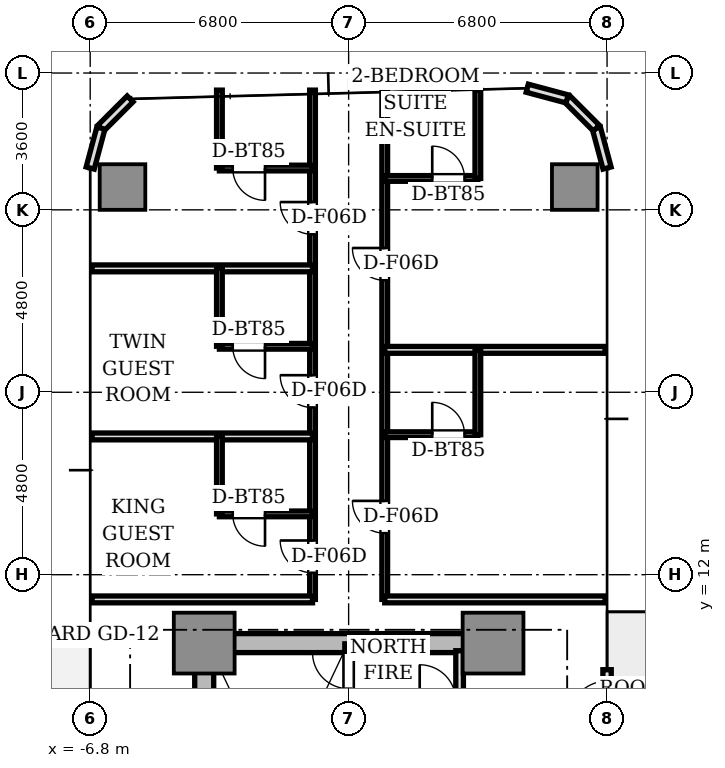
"""IFC4 building model, lengths in metres.
Left out: names, types, materials, properties, quantities, classifications, styles, units other than length and angle.
Written with IfcOpenShell. Run it as: python <this file> out.ifc"""

import sys

from ifc_helpers import new_model, si_unit, direction, frame, frame_2d, origin, origin_2d, place, context, subcontext, project, spatial, rectangle, extrude, source, transform, mapped, element, fill, save


model = new_model("IFC4")
c1 = context("Model", 3, precision=1e-05, world=origin(), true_north=direction((0.0, 1.0)))
c2 = subcontext(c1, "Body", "Model", "MODEL_VIEW")
j1 = project(units=[si_unit("LENGTHUNIT", "METRE"), si_unit("PLANEANGLEUNIT", "RADIAN")], contexts=[c1])
p1 = place(None, origin())
s1 = spatial("IfcSite", under=j1, at=p1, CompositionType="ELEMENT")
p2 = place(p1, origin())
s2 = spatial("IfcBuilding", under=s1, at=p2, CompositionType="ELEMENT")
p3 = place(p2, frame((0.0, 0.0, 46.55)))
s3 = spatial("IfcBuildingStorey", under=s2, at=p3, CompositionType="ELEMENT", Elevation=46.55)
p4 = place(p3, frame((-3.55, 10.2, 0.0), z_axis=(0.0, 0.0, 1.0), x_axis=(1.0, 0.0, 0.0)))
e1 = element("IfcWall", 1, at=p4, inside=s3, PredefinedType="SHEAR", context=c2, shape_type="SweptSolid", body=[
    extrude(rectangle(XDim=7.1, YDim=0.5, at=frame_2d((3.55, 0.0))), origin(), (0.0, 0.0, 1.0), 4.26),
])
p5 = place(p3, frame((-3.8, 2.85, 0.0), z_axis=(0.0, 0.0, 1.0), x_axis=(0.0, 1.0, 0.0)))
e2 = element("IfcWall", 2, at=p5, inside=s3, PredefinedType="SHEAR", context=c2, shape_type="SweptSolid", body=[
    extrude(rectangle(XDim=6.9, YDim=0.5, at=frame_2d((3.45, 0.0))), origin(), (0.0, 0.0, 1.0), 4.26),
])
m1 = source(origin(), c2, "Body", "SweptSolid", [
    extrude(rectangle(XDim=1.6, YDim=1.6, at=origin_2d()), origin(), (0.0, 0.0, 1.0), 4.26),
])
for number, where, z_axis, x_axis in (
    (3, (-3.8, 10.2, 0.0), (0.0, 0.0, 1.0), (1.0, 0.0, 0.0)),
    (4, (3.8, 10.2, 0.0), (0.0, 0.0, 1.0), (1.0, 0.0, 0.0)),
):
    element("IfcColumn", number, at=place(p3, frame(where, z_axis=z_axis, x_axis=x_axis)), inside=s3, PredefinedType="COLUMN", context=c2, shape_type="MappedRepresentation", body=[
        mapped(m1, transform((0.0, 0.0, 0.0), scale=1.0)),
    ])
m2 = source(origin(), c2, "Body", "SweptSolid", [
    extrude(rectangle(XDim=1.2, YDim=1.2, at=origin_2d()), origin(), (0.0, 0.0, 1.0), 4.26),
])
for number, where, z_axis, x_axis in (
    (5, (5.95, 22.2, 0.0), (0.0, 0.0, 1.0), (1.0, 0.0, 0.0)),
    (6, (-5.95, 22.2, 0.0), (0.0, 0.0, 1.0), (1.0, 0.0, 0.0)),
):
    element("IfcColumn", number, at=place(p3, frame(where, z_axis=z_axis, x_axis=x_axis)), inside=s3, PredefinedType="COLUMN", context=c2, shape_type="MappedRepresentation", body=[
        mapped(m2, transform((0.0, 0.0, 0.0), scale=1.0)),
    ])
p6 = place(p3, frame((6.8, 6.8, 0.0), z_axis=(0.0, 0.0, 1.0), x_axis=(0.0, 1.0, 0.0)))
e7 = element("IfcWall", 7, at=p6, inside=s3, PredefinedType="STANDARD", context=c2, shape_type="SweptSolid", body=[
    extrude(rectangle(XDim=2.7, YDim=0.22, at=frame_2d((1.35, 0.0))), origin(), (0.0, 0.0, 1.0), 4.26),
])
p7 = place(p6, frame((1.4, 0.0, 0.0)))
e8 = element("IfcOpeningElement", 8, at=p7, cuts=e7, PredefinedType="OPENING", context=c2, shape_type="SweptSolid", body=[
    extrude(rectangle(XDim=1.0, YDim=2.2, at=frame_2d((0.5, 1.1))), frame((0.0, 0.12, 0.0), z_axis=(0.0, -1.0, 0.0), x_axis=(1.0, 0.0, 0.0)), (0.0, 0.0, 1.0), 0.24),
])
for number, where, z_axis, x_axis in (
    (9, (6.8, 22.7, 0.0), (0.0, 0.0, 1.0), (-0.259, 0.966, 0.0)),
    (10, (6.519, 23.75, 0.0), (0.0, 0.0, 1.0), (-0.707, 0.707, 0.0)),
    (11, (5.75, 24.519, 0.0), (0.0, 0.0, 1.0), (-0.966, 0.259, 0.0)),
    (12, (-5.75, 24.519, 0.0), (0.0, 0.0, 1.0), (-0.707, -0.707, 0.0)),
    (13, (-6.519, 23.75, 0.0), (0.0, 0.0, 1.0), (-0.259, -0.966, 0.0)),
):
    element("IfcWall", number, at=place(p3, frame(where, z_axis=z_axis, x_axis=x_axis)), inside=s3, PredefinedType="STANDARD", context=c2, shape_type="SweptSolid", body=[
        extrude(rectangle(XDim=1.087, YDim=0.22, at=frame_2d((0.543, 0.0))), origin(), (0.0, 0.0, 1.0), 4.26),
    ])
p8 = place(p3, frame((0.0, 2.5, 0.0), z_axis=(0.0, 0.0, 1.0), x_axis=(0.0, 1.0, 0.0)))
e14 = element("IfcWall", 14, at=p8, inside=s3, PredefinedType="SOLIDWALL", context=c2, shape_type="SweptSolid", body=[
    extrude(rectangle(XDim=7.68, YDim=0.2, at=frame_2d((3.84, 0.0))), origin(), (0.0, 0.0, 1.0), 4.26),
])
p9 = place(p8, frame((6.5, 0.0, 0.0)))
e15 = element("IfcOpeningElement", 15, at=p9, cuts=e14, PredefinedType="OPENING", context=c2, shape_type="SweptSolid", body=[
    extrude(rectangle(XDim=0.95, YDim=2.15, at=frame_2d((0.475, 1.075))), frame((0.0, 0.11, 0.0), z_axis=(0.0, -1.0, 0.0), x_axis=(1.0, 0.0, 0.0)), (0.0, 0.0, 1.0), 0.22),
])
p10 = place(p3, frame((2.92, 8.68, 0.0), z_axis=(0.0, 0.0, 1.0), x_axis=(0.0, 1.0, 0.0)))
e16 = element("IfcWall", 16, at=p10, inside=s3, PredefinedType="SOLIDWALL", context=c2, shape_type="SweptSolid", body=[
    extrude(rectangle(XDim=1.32, YDim=0.2, at=frame_2d((0.66, 0.0))), origin(), (0.0, 0.0, 1.0), 3.81),
])
p11 = place(p3, frame((-0.95, 11.35, 0.0), z_axis=(0.0, 0.0, 1.0), x_axis=(0.0, 1.0, 0.0)))
e17 = element("IfcWall", 17, at=p11, inside=s3, PredefinedType="PARTITIONING", context=c2, shape_type="SweptSolid", body=[
    extrude(rectangle(XDim=13.4, YDim=0.15, at=frame_2d((6.7, 0.0))), origin(), (0.0, 0.0, 1.0), 3.81),
])
p12 = place(p11, frame((0.7, 0.0, 0.0)))
e18 = element("IfcOpeningElement", 18, at=p12, cuts=e17, PredefinedType="OPENING", context=c2, shape_type="SweptSolid", body=[
    extrude(rectangle(XDim=0.85, YDim=2.1, at=frame_2d((0.425, 1.05))), frame((0.0, 0.085, 0.0), z_axis=(0.0, -1.0, 0.0), x_axis=(1.0, 0.0, 0.0)), (0.0, 0.0, 1.0), 0.17),
])
p13 = place(p11, frame((5.049, 0.0, 0.0)))
e19 = element("IfcOpeningElement", 19, at=p13, cuts=e17, PredefinedType="OPENING", context=c2, shape_type="SweptSolid", body=[
    extrude(rectangle(XDim=0.85, YDim=2.1, at=frame_2d((0.425, 1.05))), frame((0.0, 0.085, 0.0), z_axis=(0.0, -1.0, 0.0), x_axis=(1.0, 0.0, 0.0)), (0.0, 0.0, 1.0), 0.17),
])
p14 = place(p11, frame((9.605, 0.0, 0.0)))
e20 = element("IfcOpeningElement", 20, at=p14, cuts=e17, PredefinedType="OPENING", context=c2, shape_type="SweptSolid", body=[
    extrude(rectangle(XDim=0.85, YDim=2.1, at=frame_2d((0.425, 1.05))), frame((0.0, 0.085, 0.0), z_axis=(0.0, -1.0, 0.0), x_axis=(1.0, 0.0, 0.0)), (0.0, 0.0, 1.0), 0.17),
])
p15 = place(p3, frame((0.95, 11.35, 0.0), z_axis=(0.0, 0.0, 1.0), x_axis=(0.0, 1.0, 0.0)))
e21 = element("IfcWall", 21, at=p15, inside=s3, PredefinedType="PARTITIONING", context=c2, shape_type="SweptSolid", body=[
    extrude(rectangle(XDim=13.4, YDim=0.15, at=frame_2d((6.7, 0.0))), origin(), (0.0, 0.0, 1.0), 3.81),
])
p16 = place(p15, frame((1.742, 0.0, 0.0)))
e22 = element("IfcOpeningElement", 22, at=p16, cuts=e21, PredefinedType="OPENING", context=c2, shape_type="SweptSolid", body=[
    extrude(rectangle(XDim=0.85, YDim=2.1, at=frame_2d((0.425, 1.05))), frame((0.0, 0.085, 0.0), z_axis=(0.0, -1.0, 0.0), x_axis=(1.0, 0.0, 0.0)), (0.0, 0.0, 1.0), 0.17),
])
p17 = place(p15, frame((8.396, 0.0, 0.0)))
e23 = element("IfcOpeningElement", 23, at=p17, cuts=e21, PredefinedType="OPENING", context=c2, shape_type="SweptSolid", body=[
    extrude(rectangle(XDim=0.85, YDim=2.1, at=frame_2d((0.425, 1.05))), frame((0.0, 0.085, 0.0), z_axis=(0.0, -1.0, 0.0), x_axis=(1.0, 0.0, 0.0)), (0.0, 0.0, 1.0), 0.17),
])
for number, where, z_axis, x_axis in (
    (24, (-0.95, 11.35, 0.0), (0.0, 0.0, 1.0), (-1.0, 0.0, 0.0)),
    (25, (6.75, 11.35, 0.0), (0.0, 0.0, 1.0), (-1.0, 0.0, 0.0)),
    (26, (-0.95, 15.638, 0.0), (0.0, 0.0, 1.0), (-1.0, 0.0, 0.0)),
):
    element("IfcWall", number, at=place(p3, frame(where, z_axis=z_axis, x_axis=x_axis)), inside=s3, PredefinedType="PARTITIONING", context=c2, shape_type="SweptSolid", body=[
        extrude(rectangle(XDim=5.8, YDim=0.18, at=frame_2d((2.9, 0.0))), origin(), (0.0, 0.0, 1.0), 3.81),
    ])
p18 = place(p3, frame((-0.95, 13.6, 0.0), z_axis=(0.0, 0.0, 1.0), x_axis=(-1.0, 0.0, 0.0)))
e27 = element("IfcWall", 27, at=p18, inside=s3, PredefinedType="PARTITIONING", context=c2, shape_type="SweptSolid", body=[
    extrude(rectangle(XDim=2.45, YDim=0.15, at=frame_2d((1.225, 0.0))), origin(), (0.0, 0.0, 1.0), 3.78),
])
p19 = place(p18, frame((1.25, 0.0, 0.0)))
e28 = element("IfcOpeningElement", 28, at=p19, cuts=e27, PredefinedType="OPENING", context=c2, shape_type="SweptSolid", body=[
    extrude(rectangle(XDim=0.85, YDim=2.1, at=frame_2d((0.425, 1.05))), frame((0.0, 0.085, 0.0), z_axis=(0.0, -1.0, 0.0), x_axis=(1.0, 0.0, 0.0)), (0.0, 0.0, 1.0), 0.17),
])
p20 = place(p3, frame((-3.4, 13.6, 0.0), z_axis=(0.0, 0.0, 1.0), x_axis=(0.0, 1.0, 0.0)))
e29 = element("IfcWall", 29, at=p20, inside=s3, PredefinedType="PARTITIONING", context=c2, shape_type="SweptSolid", body=[
    extrude(rectangle(XDim=2.038, YDim=0.15, at=frame_2d((1.019, 0.0))), origin(), (0.0, 0.0, 1.0), 3.81),
])
p21 = place(p3, frame((-0.95, 20.06, 0.0), z_axis=(0.0, 0.0, 1.0), x_axis=(-1.0, 0.0, 0.0)))
e30 = element("IfcWall", 30, at=p21, inside=s3, PredefinedType="PARTITIONING", context=c2, shape_type="SweptSolid", body=[
    extrude(rectangle(XDim=5.8, YDim=0.18, at=frame_2d((2.9, 0.0))), origin(), (0.0, 0.0, 1.0), 3.81),
])
p22 = place(p3, frame((-0.95, 18.01, 0.0), z_axis=(0.0, 0.0, 1.0), x_axis=(-1.0, 0.0, 0.0)))
e31 = element("IfcWall", 31, at=p22, inside=s3, PredefinedType="PARTITIONING", context=c2, shape_type="SweptSolid", body=[
    extrude(rectangle(XDim=2.45, YDim=0.15, at=frame_2d((1.225, 0.0))), origin(), (0.0, 0.0, 1.0), 3.81),
])
p23 = place(p22, frame((1.25, 0.0, 0.0)))
e32 = element("IfcOpeningElement", 32, at=p23, cuts=e31, PredefinedType="OPENING", context=c2, shape_type="SweptSolid", body=[
    extrude(rectangle(XDim=0.85, YDim=2.1, at=frame_2d((0.425, 1.05))), frame((0.0, 0.085, 0.0), z_axis=(0.0, -1.0, 0.0), x_axis=(1.0, 0.0, 0.0)), (0.0, 0.0, 1.0), 0.17),
])
p24 = place(p3, frame((-3.4, 18.01, 0.0), z_axis=(0.0, 0.0, 1.0), x_axis=(0.0, 1.0, 0.0)))
e33 = element("IfcWall", 33, at=p24, inside=s3, PredefinedType="PARTITIONING", context=c2, shape_type="SweptSolid", body=[
    extrude(rectangle(XDim=2.05, YDim=0.15, at=frame_2d((1.025, 0.0))), origin(), (0.0, 0.0, 1.0), 3.81),
])
p25 = place(p3, frame((-0.95, 22.7, 0.0), z_axis=(0.0, 0.0, 1.0), x_axis=(-1.0, 0.0, 0.0)))
e34 = element("IfcWall", 34, at=p25, inside=s3, PredefinedType="PARTITIONING", context=c2, shape_type="SweptSolid", body=[
    extrude(rectangle(XDim=2.45, YDim=0.15, at=frame_2d((1.225, 0.0))), origin(), (0.0, 0.0, 1.0), 3.81),
])
p26 = place(p25, frame((1.25, 0.0, 0.0)))
e35 = element("IfcOpeningElement", 35, at=p26, cuts=e34, PredefinedType="OPENING", context=c2, shape_type="SweptSolid", body=[
    extrude(rectangle(XDim=0.85, YDim=2.1, at=frame_2d((0.425, 1.05))), frame((0.0, 0.085, 0.0), z_axis=(0.0, -1.0, 0.0), x_axis=(1.0, 0.0, 0.0)), (0.0, 0.0, 1.0), 0.17),
])
p27 = place(p3, frame((-3.4, 22.7, 0.0), z_axis=(0.0, 0.0, 1.0), x_axis=(0.0, 1.0, 0.0)))
e36 = element("IfcWall", 36, at=p27, inside=s3, PredefinedType="PARTITIONING", context=c2, shape_type="SweptSolid", body=[
    extrude(rectangle(XDim=2.05, YDim=0.15, at=frame_2d((1.025, 0.0))), origin(), (0.0, 0.0, 1.0), 3.81),
])
p28 = place(p3, frame((0.95, 17.916, 0.0), z_axis=(0.0, 0.0, 1.0), x_axis=(1.0, 0.0, 0.0)))
e37 = element("IfcWall", 37, at=p28, inside=s3, PredefinedType="PARTITIONING", context=c2, shape_type="SweptSolid", body=[
    extrude(rectangle(XDim=5.8, YDim=0.18, at=frame_2d((2.9, 0.0))), origin(), (0.0, 0.0, 1.0), 3.81),
])
p29 = place(p3, frame((0.95, 15.684, 0.0), z_axis=(0.0, 0.0, 1.0), x_axis=(1.0, 0.0, 0.0)))
e38 = element("IfcWall", 38, at=p29, inside=s3, PredefinedType="PARTITIONING", context=c2, shape_type="SweptSolid", body=[
    extrude(rectangle(XDim=2.45, YDim=0.15, at=frame_2d((1.225, 0.0))), origin(), (0.0, 0.0, 1.0), 3.81),
])
p30 = place(p29, frame((1.25, 0.0, 0.0)))
e39 = element("IfcOpeningElement", 39, at=p30, cuts=e38, PredefinedType="OPENING", context=c2, shape_type="SweptSolid", body=[
    extrude(rectangle(XDim=0.85, YDim=2.1, at=frame_2d((0.425, 1.05))), frame((0.0, 0.085, 0.0), z_axis=(0.0, -1.0, 0.0), x_axis=(1.0, 0.0, 0.0)), (0.0, 0.0, 1.0), 0.17),
])
p31 = place(p3, frame((3.4, 15.684, 0.0), z_axis=(0.0, 0.0, 1.0), x_axis=(0.0, 1.0, 0.0)))
e40 = element("IfcWall", 40, at=p31, inside=s3, PredefinedType="PARTITIONING", context=c2, shape_type="SweptSolid", body=[
    extrude(rectangle(XDim=2.232, YDim=0.15, at=frame_2d((1.116, 0.0))), origin(), (0.0, 0.0, 1.0), 3.81),
])
p32 = place(p3, frame((0.95, 22.426, 0.0), z_axis=(0.0, 0.0, 1.0), x_axis=(1.0, 0.0, 0.0)))
e41 = element("IfcWall", 41, at=p32, inside=s3, PredefinedType="PARTITIONING", context=c2, shape_type="SweptSolid", body=[
    extrude(rectangle(XDim=2.45, YDim=0.15, at=frame_2d((1.225, 0.0))), origin(), (0.0, 0.0, 1.0), 3.73),
])
p33 = place(p32, frame((1.25, 0.0, 0.0)))
e42 = element("IfcOpeningElement", 42, at=p33, cuts=e41, PredefinedType="OPENING", context=c2, shape_type="SweptSolid", body=[
    extrude(rectangle(XDim=0.85, YDim=2.1, at=frame_2d((0.425, 1.05))), frame((0.0, 0.085, 0.0), z_axis=(0.0, -1.0, 0.0), x_axis=(1.0, 0.0, 0.0)), (0.0, 0.0, 1.0), 0.17),
])
p34 = place(p3, frame((3.4, 22.426, 0.0), z_axis=(0.0, 0.0, 1.0), x_axis=(0.0, 1.0, 0.0)))
e43 = element("IfcWall", 43, at=p34, inside=s3, PredefinedType="PARTITIONING", context=c2, shape_type="SweptSolid", body=[
    extrude(rectangle(XDim=2.324, YDim=0.15, at=frame_2d((1.162, 0.0))), origin(), (0.0, 0.0, 1.0), 3.81),
])
m3 = source(origin(), c2, "Body", "SweptSolid", [
    extrude(rectangle(XDim=1.0, YDim=0.05, at=origin_2d()), origin(), (0.0, 0.0, 1.0), 2.2),
])
p35 = place(p7, frame((0.5, 0.0, 0.0)))
e44 = element("IfcDoor", 44, at=p35, inside=s3, OperationType="SINGLE_SWING_LEFT", PredefinedType="DOOR", context=c2, shape_type="MappedRepresentation", body=[
    mapped(m3, transform((0.0, 0.0, 0.0), scale=1.0)),
])
fill(e8, e44)
m4 = source(origin(), c2, "Body", "SweptSolid", [
    extrude(rectangle(XDim=0.95, YDim=0.05, at=origin_2d()), origin(), (0.0, 0.0, 1.0), 2.15),
])
p36 = place(p9, frame((0.475, 0.0, 0.0)))
e45 = element("IfcDoor", 45, at=p36, inside=s3, OperationType="SINGLE_SWING_RIGHT", PredefinedType="DOOR", context=c2, shape_type="MappedRepresentation", body=[
    mapped(m4, transform((0.0, 0.0, 0.0), scale=1.0)),
])
fill(e15, e45)
m5 = source(origin(), c2, "Body", "SweptSolid", [
    extrude(rectangle(XDim=0.85, YDim=0.05, at=origin_2d()), origin(), (0.0, 0.0, 1.0), 2.1),
])
p37 = place(p19, frame((0.425, 0.0, 0.0)))
e46 = element("IfcDoor", 46, at=p37, inside=s3, OperationType="SINGLE_SWING_LEFT", PredefinedType="DOOR", context=c2, shape_type="MappedRepresentation", body=[
    mapped(m5, transform((0.0, 0.0, 0.0), scale=1.0)),
])
fill(e28, e46)
p38 = place(p12, frame((0.425, 0.0, 0.0)))
e47 = element("IfcDoor", 47, at=p38, inside=s3, OperationType="SINGLE_SWING_RIGHT", PredefinedType="DOOR", context=c2, shape_type="MappedRepresentation", body=[
    mapped(m5, transform((0.0, 0.0, 0.0), scale=1.0)),
])
fill(e18, e47)
p39 = place(p23, frame((0.425, 0.0, 0.0)))
e48 = element("IfcDoor", 48, at=p39, inside=s3, OperationType="SINGLE_SWING_LEFT", PredefinedType="DOOR", context=c2, shape_type="MappedRepresentation", body=[
    mapped(m5, transform((0.0, 0.0, 0.0), scale=1.0)),
])
fill(e32, e48)
p40 = place(p13, frame((0.425, 0.0, 0.0)))
e49 = element("IfcDoor", 49, at=p40, inside=s3, OperationType="SINGLE_SWING_RIGHT", PredefinedType="DOOR", context=c2, shape_type="MappedRepresentation", body=[
    mapped(m5, transform((0.0, 0.0, 0.0), scale=1.0)),
])
fill(e19, e49)
p41 = place(p26, frame((0.425, 0.0, 0.0)))
e50 = element("IfcDoor", 50, at=p41, inside=s3, OperationType="SINGLE_SWING_LEFT", PredefinedType="DOOR", context=c2, shape_type="MappedRepresentation", body=[
    mapped(m5, transform((0.0, 0.0, 0.0), scale=1.0)),
])
fill(e35, e50)
p42 = place(p14, frame((0.425, 0.0, 0.0)))
e51 = element("IfcDoor", 51, at=p42, inside=s3, OperationType="SINGLE_SWING_RIGHT", PredefinedType="DOOR", context=c2, shape_type="MappedRepresentation", body=[
    mapped(m5, transform((0.0, 0.0, 0.0), scale=1.0)),
])
fill(e20, e51)
p43 = place(p30, frame((0.425, 0.0, 0.0)))
e52 = element("IfcDoor", 52, at=p43, inside=s3, OperationType="SINGLE_SWING_LEFT", PredefinedType="DOOR", context=c2, shape_type="MappedRepresentation", body=[
    mapped(m5, transform((0.0, 0.0, 0.0), scale=1.0)),
])
fill(e39, e52)
p44 = place(p16, frame((0.425, 0.0, 0.0)))
e53 = element("IfcDoor", 53, at=p44, inside=s3, OperationType="SINGLE_SWING_RIGHT", PredefinedType="DOOR", context=c2, shape_type="MappedRepresentation", body=[
    mapped(m5, transform((0.0, 0.0, 0.0), scale=1.0)),
])
fill(e22, e53)
p45 = place(p33, frame((0.425, 0.0, 0.0)))
e54 = element("IfcDoor", 54, at=p45, inside=s3, OperationType="SINGLE_SWING_LEFT", PredefinedType="DOOR", context=c2, shape_type="MappedRepresentation", body=[
    mapped(m5, transform((0.0, 0.0, 0.0), scale=1.0)),
])
fill(e42, e54)
p46 = place(p17, frame((0.425, 0.0, 0.0)))
e55 = element("IfcDoor", 55, at=p46, inside=s3, OperationType="SINGLE_SWING_RIGHT", PredefinedType="DOOR", context=c2, shape_type="MappedRepresentation", body=[
    mapped(m5, transform((0.0, 0.0, 0.0), scale=1.0)),
])
fill(e23, e55)
save(model, sys.argv[1])
